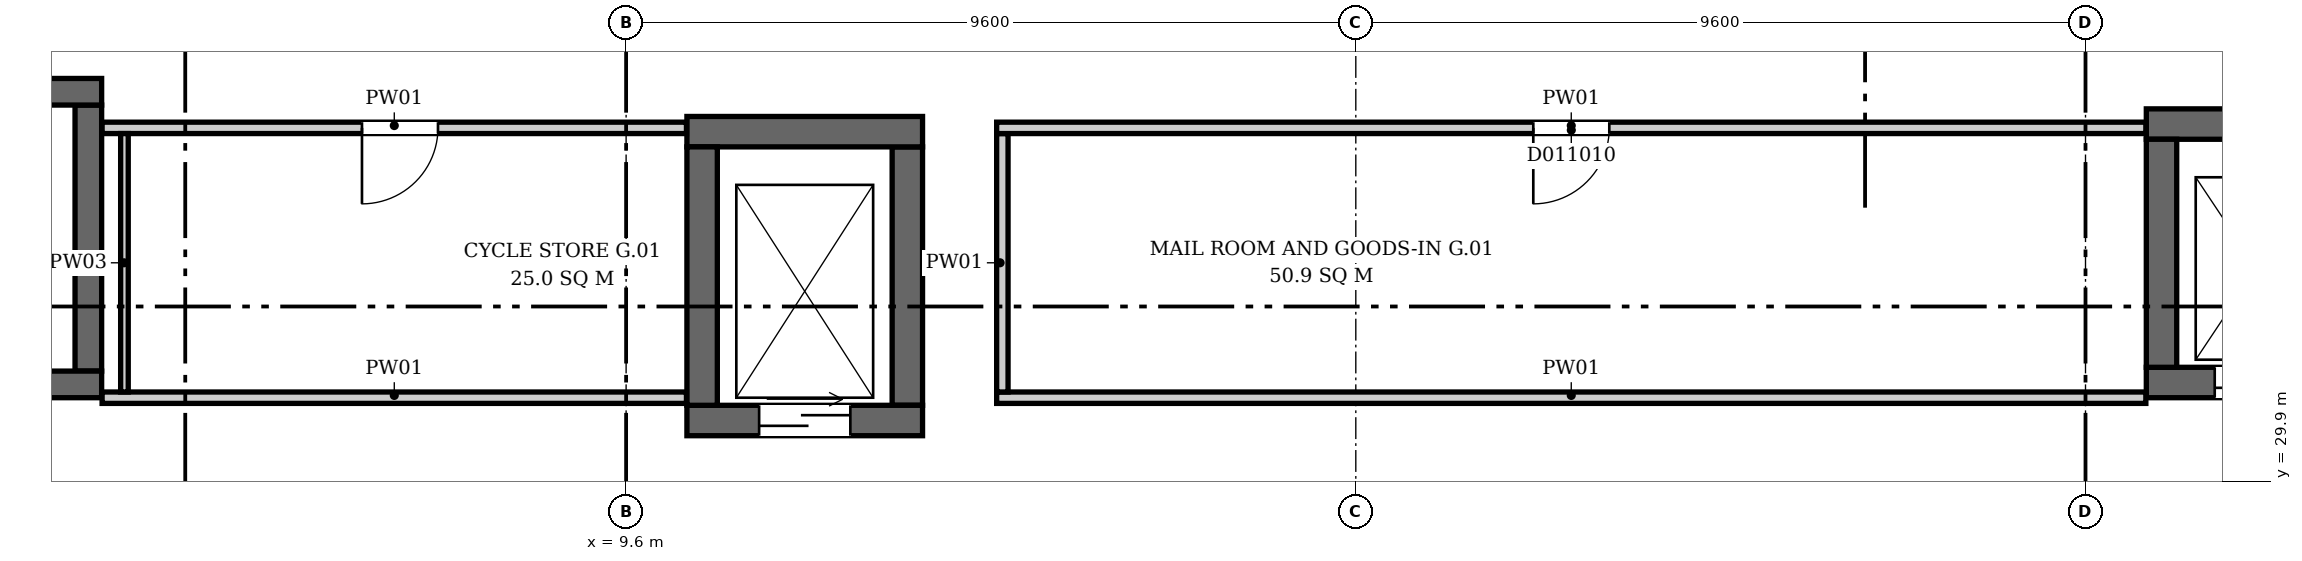
"""IFC4 building model, lengths in metres.
Left out: names, types, materials, properties, quantities, classifications, styles, units other than length and angle.
Written with IfcOpenShell. Run it as: python <this file> out.ifc"""

import sys

from ifc_helpers import new_model, si_unit, direction, frame, frame_2d, origin, place, context, subcontext, project, spatial, rectangle, extrude, element, fill, save


model = new_model("IFC4")
c1 = context("Model", 3, precision=1e-05, world=origin(), true_north=direction((0.0, 1.0)))
c2 = subcontext(c1, "Body", "Model", "MODEL_VIEW")
j1 = project(units=[si_unit("LENGTHUNIT", "METRE"), si_unit("PLANEANGLEUNIT", "RADIAN")], contexts=[c1])
p1 = place(None, origin())
s1 = spatial("IfcSite", under=j1, at=p1, CompositionType="ELEMENT")
p2 = place(p1, origin())
s2 = spatial("IfcBuilding", under=s1, at=p2, CompositionType="ELEMENT")
p3 = place(p2, origin())
s3 = spatial("IfcBuildingStorey", under=s2, at=p3, CompositionType="ELEMENT", Elevation=0.0)
for number, where, z_axis, x_axis in (
    (1, (0.2, 31.175, 0.0), (0.0, 0.0, 1.0), (1.0, 0.0, 0.0)),
    (2, (0.2, 35.025, 0.0), (0.0, 0.0, 1.0), (1.0, 0.0, 0.0)),
):
    element("IfcWall", number, at=place(p3, frame(where, z_axis=z_axis, x_axis=x_axis)), inside=s3, PredefinedType="SHEAR", context=c2, shape_type="SweptSolid", body=[
        extrude(rectangle(XDim=2.5, YDim=0.35, at=frame_2d((1.25, 0.0))), origin(), (0.0, 0.0, 1.0), 6.5),
    ])
p4 = place(p3, frame((2.525, 31.35, 0.0), z_axis=(0.0, 0.0, 1.0), x_axis=(0.0, 1.0, 0.0)))
e3 = element("IfcWall", 3, at=p4, inside=s3, PredefinedType="SHEAR", context=c2, shape_type="SweptSolid", body=[
    extrude(rectangle(XDim=3.5, YDim=0.35, at=frame_2d((1.75, 0.0))), origin(), (0.0, 0.0, 1.0), 6.5),
])
p5 = place(p3, frame((10.4, 30.7, 0.0), z_axis=(0.0, 0.0, 1.0), x_axis=(1.0, 0.0, 0.0)))
e4 = element("IfcWall", 4, at=p5, inside=s3, PredefinedType="SHEAR", context=c2, shape_type="SweptSolid", body=[
    extrude(rectangle(XDim=3.1, YDim=0.4, at=frame_2d((1.55, 0.0))), origin(), (0.0, 0.0, 1.0), 6.5),
])
p6 = place(p5, frame((0.95, 0.0, 0.0)))
e5 = element("IfcOpeningElement", 5, at=p6, cuts=e4, PredefinedType="OPENING", context=c2, shape_type="SweptSolid", body=[
    extrude(rectangle(XDim=1.2, YDim=2.1, at=frame_2d((0.6, 1.05))), frame((0.0, 0.21, 0.0), z_axis=(0.0, -1.0, 0.0), x_axis=(1.0, 0.0, 0.0)), (0.0, 0.0, 1.0), 0.42),
])
p7 = place(p3, frame((10.4, 34.5, 0.0), z_axis=(0.0, 0.0, 1.0), x_axis=(1.0, 0.0, 0.0)))
e6 = element("IfcWall", 6, at=p7, inside=s3, PredefinedType="SHEAR", context=c2, shape_type="SweptSolid", body=[
    extrude(rectangle(XDim=3.1, YDim=0.4, at=frame_2d((1.55, 0.0))), origin(), (0.0, 0.0, 1.0), 6.5),
])
for number, where, z_axis, x_axis in (
    (7, (10.6, 30.9, 0.0), (0.0, 0.0, 1.0), (0.0, 1.0, 0.0)),
    (8, (13.3, 30.9, 0.0), (0.0, 0.0, 1.0), (0.0, 1.0, 0.0)),
):
    element("IfcWall", number, at=place(p3, frame(where, z_axis=z_axis, x_axis=x_axis)), inside=s3, PredefinedType="SHEAR", context=c2, shape_type="SweptSolid", body=[
        extrude(rectangle(XDim=3.4, YDim=0.4, at=frame_2d((1.7, 0.0))), origin(), (0.0, 0.0, 1.0), 6.5),
    ])
p8 = place(p3, frame((29.6, 31.2, 0.0), z_axis=(0.0, 0.0, 1.0), x_axis=(1.0, 0.0, 0.0)))
e9 = element("IfcWall", 9, at=p8, inside=s3, PredefinedType="SHEAR", context=c2, shape_type="SweptSolid", body=[
    extrude(rectangle(XDim=2.9, YDim=0.4, at=frame_2d((1.45, 0.0))), origin(), (0.0, 0.0, 1.0), 6.5),
])
p9 = place(p8, frame((0.9, 0.0, 0.0)))
e10 = element("IfcOpeningElement", 10, at=p9, cuts=e9, PredefinedType="OPENING", context=c2, shape_type="SweptSolid", body=[
    extrude(rectangle(XDim=1.1, YDim=2.1, at=frame_2d((0.55, 1.05))), frame((0.0, 0.21, 0.0), z_axis=(0.0, -1.0, 0.0), x_axis=(1.0, 0.0, 0.0)), (0.0, 0.0, 1.0), 0.42),
])
p10 = place(p3, frame((29.6, 34.6, 0.0), z_axis=(0.0, 0.0, 1.0), x_axis=(1.0, 0.0, 0.0)))
e11 = element("IfcWall", 11, at=p10, inside=s3, PredefinedType="SHEAR", context=c2, shape_type="SweptSolid", body=[
    extrude(rectangle(XDim=2.9, YDim=0.4, at=frame_2d((1.45, 0.0))), origin(), (0.0, 0.0, 1.0), 6.5),
])
p11 = place(p3, frame((29.8, 31.4, 0.0), z_axis=(0.0, 0.0, 1.0), x_axis=(0.0, 1.0, 0.0)))
e12 = element("IfcWall", 12, at=p11, inside=s3, PredefinedType="SHEAR", context=c2, shape_type="SweptSolid", body=[
    extrude(rectangle(XDim=3.0, YDim=0.4, at=frame_2d((1.5, 0.0))), origin(), (0.0, 0.0, 1.0), 6.5),
])
p12 = place(p3, frame((2.706, 31.0, 0.0), z_axis=(0.0, 0.0, 1.0), x_axis=(1.0, 0.0, 0.0)))
e13 = element("IfcWall", 13, at=p12, inside=s3, PredefinedType="PARTITIONING", context=c2, shape_type="SweptSolid", body=[
    extrude(rectangle(XDim=7.688, YDim=0.15, at=frame_2d((3.844, 0.0))), origin(), (0.0, 0.0, 1.0), 6.15),
])
p13 = place(p3, frame((2.706, 34.55, 0.0), z_axis=(0.0, 0.0, 1.0), x_axis=(1.0, 0.0, 0.0)))
e14 = element("IfcWall", 14, at=p13, inside=s3, PredefinedType="PARTITIONING", context=c2, shape_type="SweptSolid", body=[
    extrude(rectangle(XDim=7.688, YDim=0.15, at=frame_2d((3.844, 0.0))), origin(), (0.0, 0.0, 1.0), 6.15),
])
p14 = place(p13, frame((3.419, 0.0, 0.0)))
e15 = element("IfcOpeningElement", 15, at=p14, cuts=e14, PredefinedType="OPENING", context=c2, shape_type="SweptSolid", body=[
    extrude(rectangle(XDim=1.0, YDim=2.1, at=frame_2d((0.5, 1.05))), frame((0.0, 0.085, 0.0), z_axis=(0.0, -1.0, 0.0), x_axis=(1.0, 0.0, 0.0)), (0.0, 0.0, 1.0), 0.17),
])
p15 = place(p3, frame((3.0, 31.075, 0.0), z_axis=(0.0, 0.0, 1.0), x_axis=(0.0, 1.0, 0.0)))
e16 = element("IfcWall", 16, at=p15, inside=s3, PredefinedType="PARTITIONING", context=c2, shape_type="SweptSolid", body=[
    extrude(rectangle(XDim=3.4, YDim=0.1, at=frame_2d((1.7, 0.0))), origin(), (0.0, 0.0, 1.0), 6.15),
])
p16 = place(p3, frame((14.475, 31.0, 0.0), z_axis=(0.0, 0.0, 1.0), x_axis=(1.0, 0.0, 0.0)))
e17 = element("IfcWall", 17, at=p16, inside=s3, PredefinedType="PARTITIONING", context=c2, shape_type="SweptSolid", body=[
    extrude(rectangle(XDim=15.119, YDim=0.15, at=frame_2d((7.56, 0.0))), origin(), (0.0, 0.0, 1.0), 6.15),
])
p17 = place(p3, frame((14.55, 31.075, 0.0), z_axis=(0.0, 0.0, 1.0), x_axis=(0.0, 1.0, 0.0)))
e18 = element("IfcWall", 18, at=p17, inside=s3, PredefinedType="PARTITIONING", context=c2, shape_type="SweptSolid", body=[
    extrude(rectangle(XDim=3.4, YDim=0.15, at=frame_2d((1.7, 0.0))), origin(), (0.0, 0.0, 1.0), 6.15),
])
p18 = place(p3, frame((14.475, 34.55, 0.0), z_axis=(0.0, 0.0, 1.0), x_axis=(1.0, 0.0, 0.0)))
e19 = element("IfcWall", 19, at=p18, inside=s3, PredefinedType="PARTITIONING", context=c2, shape_type="SweptSolid", body=[
    extrude(rectangle(XDim=15.119, YDim=0.15, at=frame_2d((7.56, 0.0))), origin(), (0.0, 0.0, 1.0), 6.15),
])
p19 = place(p18, frame((7.06, 0.0, 0.0)))
e20 = element("IfcOpeningElement", 20, at=p19, cuts=e19, PredefinedType="OPENING", context=c2, shape_type="SweptSolid", body=[
    extrude(rectangle(XDim=1.0, YDim=2.1, at=frame_2d((0.5, 1.05))), frame((0.0, 0.085, 0.0), z_axis=(0.0, -1.0, 0.0), x_axis=(1.0, 0.0, 0.0)), (0.0, 0.0, 1.0), 0.17),
])
p20 = place(p6, origin())
e21 = element("IfcDoor", 21, at=p20, inside=s3, OperationType="DOUBLE_DOOR_SLIDING", PredefinedType="DOOR", context=c2, shape_type="SweptSolid", body=[
    extrude(rectangle(XDim=1.2, YDim=2.1, at=frame_2d((0.6, 1.05))), frame((0.0, 0.025, 0.0), z_axis=(0.0, -1.0, 0.0), x_axis=(1.0, 0.0, 0.0)), (0.0, 0.0, 1.0), 0.05),
])
fill(e5, e21)
p21 = place(p9, origin())
e22 = element("IfcDoor", 22, at=p21, inside=s3, OperationType="DOUBLE_DOOR_SLIDING", PredefinedType="DOOR", context=c2, shape_type="SweptSolid", body=[
    extrude(rectangle(XDim=1.1, YDim=2.1, at=frame_2d((0.55, 1.05))), frame((0.0, 0.025, 0.0), z_axis=(0.0, -1.0, 0.0), x_axis=(1.0, 0.0, 0.0)), (0.0, 0.0, 1.0), 0.05),
])
fill(e10, e22)
p22 = place(p19, origin())
e23 = element("IfcDoor", 23, at=p22, inside=s3, OperationType="SINGLE_SWING_LEFT", PredefinedType="DOOR", context=c2, shape_type="SweptSolid", body=[
    extrude(rectangle(XDim=1.0, YDim=2.1, at=frame_2d((0.5, 1.05))), frame((0.0, 0.025, 0.0), z_axis=(0.0, -1.0, 0.0), x_axis=(1.0, 0.0, 0.0)), (0.0, 0.0, 1.0), 0.05),
])
fill(e20, e23)
p23 = place(p14, origin())
e24 = element("IfcDoor", 24, at=p23, inside=s3, OperationType="SINGLE_SWING_LEFT", PredefinedType="DOOR", context=c2, shape_type="SweptSolid", body=[
    extrude(rectangle(XDim=1.0, YDim=2.1, at=frame_2d((0.5, 1.05))), frame((0.0, 0.025, 0.0), z_axis=(0.0, -1.0, 0.0), x_axis=(1.0, 0.0, 0.0)), (0.0, 0.0, 1.0), 0.05),
])
fill(e15, e24)
save(model, sys.argv[1])
